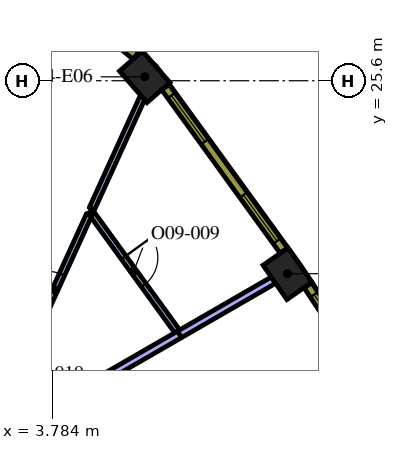
"""IFC4 building model, lengths in metres.
Left out: names, types, materials, properties, quantities, classifications, styles, units other than length and angle.
Written with IfcOpenShell. Run it as: python <this file> out.ifc"""

import sys

from ifc_helpers import new_model, si_unit, direction, frame, frame_2d, origin, origin_2d, place, context, subcontext, project, spatial, rectangle, extrude, element, fill, save


model = new_model("IFC4")
c1 = context("Model", 3, precision=1e-05, world=origin(), true_north=direction((0.0, 1.0)))
c2 = subcontext(c1, "Body", "Model", "MODEL_VIEW")
j1 = project(units=[si_unit("LENGTHUNIT", "METRE"), si_unit("PLANEANGLEUNIT", "RADIAN")], contexts=[c1])
p1 = place(None, origin())
s1 = spatial("IfcSite", under=j1, at=p1, CompositionType="ELEMENT")
p2 = place(p1, origin())
s2 = spatial("IfcBuilding", under=s1, at=p2, CompositionType="ELEMENT")
p3 = place(p2, frame((0.0, 0.0, 239.4)))
s3 = spatial("IfcBuildingStorey", under=s2, at=p3, CompositionType="ELEMENT", Elevation=239.4)
for number, where, z_axis, x_axis in (
    (1, (9.975, 20.522, 0.0), (0.0, 0.0, 1.0), (-0.57, 0.822, 0.0)),
    (2, (6.219, 25.703, 0.0), (0.0, 0.0, 1.0), (-0.657, 0.754, 0.0)),
):
    element("IfcColumn", number, at=place(p3, frame(where, z_axis=z_axis, x_axis=x_axis)), inside=s3, PredefinedType="COLUMN", context=c2, shape_type="SweptSolid", body=[
        extrude(rectangle(XDim=1.1, YDim=0.8, at=origin_2d()), origin(), (0.0, 0.0, 1.0), 4.2),
    ])
p4 = place(p3, frame((7.128, 18.922, 0.0), z_axis=(0.0, 0.0, 1.0), x_axis=(0.866023575777, 0.500003166188, 0.0)))
e3 = element("IfcWall", 3, at=p4, inside=s3, PredefinedType="PARTITIONING", context=c2, shape_type="SweptSolid", body=[
    extrude(rectangle(XDim=2.861, YDim=0.2, at=frame_2d((1.43, 0.0))), origin(), (0.0, 0.0, 1.0), 3.45),
])
p5 = place(p3, frame((4.111, 17.18, 0.0), z_axis=(0.0, 0.0, 1.0), x_axis=(0.866031916153, 0.499988720078, 0.0)))
e4 = element("IfcWall", 4, at=p5, inside=s3, PredefinedType="PARTITIONING", context=c2, shape_type="SweptSolid", body=[
    extrude(rectangle(XDim=3.492, YDim=0.2, at=frame_2d((1.746, 0.0))), origin(), (0.0, 0.0, 1.0), 3.45),
])
p6 = place(p3, frame((4.791, 22.152, 0.0), z_axis=(0.0, 0.0, 1.0), x_axis=(0.586987127968, -0.809596264567, 0.0)))
e5 = element("IfcWall", 5, at=p6, inside=s3, PredefinedType="PARTITIONING", context=c2, shape_type="SweptSolid", body=[
    extrude(rectangle(XDim=3.887, YDim=0.15, at=frame_2d((1.943, 0.0))), origin(), (0.0, 0.0, 1.0), 3.45),
])
p7 = place(p6, frame((1.487, 0.0, 0.0)))
e6 = element("IfcOpeningElement", 6, at=p7, cuts=e5, PredefinedType="OPENING", context=c2, shape_type="SweptSolid", body=[
    extrude(rectangle(XDim=0.9, YDim=2.1, at=frame_2d((0.45, 1.05))), frame((0.0, 0.085, 0.0), z_axis=(0.0, -1.0, 0.0), x_axis=(1.0, 0.0, 0.0)), (0.0, 0.0, 1.0), 0.17),
])
p8 = place(p3, frame((4.827, 22.23, 0.0), z_axis=(0.0, 0.0, 1.0), x_axis=(0.414339921123, 0.91012220595, 0.0)))
e7 = element("IfcWall", 7, at=p8, inside=s3, PredefinedType="PARTITIONING", context=c2, shape_type="SweptSolid", body=[
    extrude(rectangle(XDim=3.219, YDim=0.15, at=frame_2d((1.61, 0.0))), origin(), (0.0, 0.0, 1.0), 3.45),
])
p9 = place(p3, frame((3.129, 18.5, 0.0), z_axis=(0.0, 0.0, 1.0), x_axis=(0.414332290546, 0.910125679789, 0.0)))
e8 = element("IfcWall", 8, at=p9, inside=s3, PredefinedType="PARTITIONING", context=c2, shape_type="SweptSolid", body=[
    extrude(rectangle(XDim=3.926, YDim=0.15, at=frame_2d((1.963, 0.0))), origin(), (0.0, 0.0, 1.0), 3.45),
])
p10 = place(p9, frame((1.3, 0.0, 0.0)))
e9 = element("IfcOpeningElement", 9, at=p10, cuts=e8, PredefinedType="OPENING", context=c2, shape_type="SweptSolid", body=[
    extrude(rectangle(XDim=0.9, YDim=2.1, at=frame_2d((0.45, 1.05))), frame((0.0, 0.085, 0.0), z_axis=(0.0, -1.0, 0.0), x_axis=(1.0, 0.0, 0.0)), (0.0, 0.0, 1.0), 0.17),
])
p11 = place(p3, frame((4.061, 17.266, 0.0), z_axis=(0.0, 0.0, 1.0), x_axis=(-0.49995489152, 0.866051445611, 0.0)))
e10 = element("IfcWall", 10, at=p11, inside=s3, PredefinedType="PARTITIONING", context=c2, shape_type="SweptSolid", body=[
    extrude(rectangle(XDim=1.425, YDim=0.2, at=frame_2d((0.712, 0.0))), origin(), (0.0, 0.0, 1.0), 3.45),
])
p12 = place(p11, frame((0.2, 0.0, 0.0)))
e11 = element("IfcOpeningElement", 11, at=p12, cuts=e10, PredefinedType="OPENING", context=c2, shape_type="SweptSolid", body=[
    extrude(rectangle(XDim=1.0, YDim=2.1, at=frame_2d((0.5, 1.05))), frame((0.0, 0.11, 0.0), z_axis=(0.0, -1.0, 0.0), x_axis=(1.0, 0.0, 0.0)), (0.0, 0.0, 1.0), 0.22),
])
p13 = place(p3, frame((13.442, 15.803, 0.0), z_axis=(0.0, 0.0, 1.0), x_axis=(-0.552901821755, 0.833246407433, 0.0)))
e12 = element("IfcWall", 12, at=p13, inside=s3, PredefinedType="SOLIDWALL", context=c2, shape_type="SweptSolid", body=[
    extrude(rectangle(XDim=5.298, YDim=0.24, at=frame_2d((2.649, 0.0))), origin(), (0.0, 0.0, 1.0), 3.95),
])
p14 = place(p13, frame((0.295, 0.0, 0.9)))
e13 = element("IfcOpeningElement", 13, at=p14, cuts=e12, PredefinedType="OPENING", context=c2, shape_type="SweptSolid", body=[
    extrude(rectangle(XDim=1.5, YDim=2.55, at=frame_2d((0.75, 1.275))), frame((0.0, 0.13, 0.0), z_axis=(0.0, -1.0, 0.0), x_axis=(1.0, 0.0, 0.0)), (0.0, 0.0, 1.0), 0.26),
])
p15 = place(p13, frame((3.504, 0.0, 0.9)))
e14 = element("IfcOpeningElement", 14, at=p15, cuts=e12, PredefinedType="OPENING", context=c2, shape_type="SweptSolid", body=[
    extrude(rectangle(XDim=1.5, YDim=2.55, at=frame_2d((0.75, 1.275))), frame((0.0, 0.13, 0.0), z_axis=(0.0, -1.0, 0.0), x_axis=(1.0, 0.0, 0.0)), (0.0, 0.0, 1.0), 0.26),
])
p16 = place(p3, frame((9.878, 21.132, 0.0), z_axis=(0.0, 0.0, 1.0), x_axis=(-0.586998456641, 0.80958805074, 0.0)))
e15 = element("IfcWall", 15, at=p16, inside=s3, PredefinedType="SOLIDWALL", context=c2, shape_type="SweptSolid", body=[
    extrude(rectangle(XDim=5.311, YDim=0.24, at=frame_2d((2.655, 0.0))), origin(), (0.0, 0.0, 1.0), 3.95),
])
p17 = place(p16, frame((0.306, 0.0, 0.9)))
e16 = element("IfcOpeningElement", 16, at=p17, cuts=e15, PredefinedType="OPENING", context=c2, shape_type="SweptSolid", body=[
    extrude(rectangle(XDim=1.5, YDim=2.55, at=frame_2d((0.75, 1.275))), frame((0.0, 0.13, 0.0), z_axis=(0.0, -1.0, 0.0), x_axis=(1.0, 0.0, 0.0)), (0.0, 0.0, 1.0), 0.26),
])
p18 = place(p16, frame((3.539, 0.0, 0.9)))
e17 = element("IfcOpeningElement", 17, at=p18, cuts=e15, PredefinedType="OPENING", context=c2, shape_type="SweptSolid", body=[
    extrude(rectangle(XDim=1.5, YDim=2.55, at=frame_2d((0.75, 1.275))), frame((0.0, 0.13, 0.0), z_axis=(0.0, -1.0, 0.0), x_axis=(1.0, 0.0, 0.0)), (0.0, 0.0, 1.0), 0.26),
])
p19 = place(p3, frame((5.987, 26.259, 0.0), z_axis=(0.0, 0.0, 1.0), x_axis=(-0.769990037733, 0.638055908045, 0.0)))
e18 = element("IfcWall", 18, at=p19, inside=s3, PredefinedType="SOLIDWALL", context=c2, shape_type="SweptSolid", body=[
    extrude(rectangle(XDim=2.609, YDim=0.24, at=frame_2d((1.305, 0.0))), origin(), (0.0, 0.0, 1.0), 3.95),
])
p20 = place(p19, frame((0.805, 0.0, 0.9)))
e19 = element("IfcOpeningElement", 19, at=p20, cuts=e18, PredefinedType="OPENING", context=c2, shape_type="SweptSolid", body=[
    extrude(rectangle(XDim=1.0, YDim=2.55, at=frame_2d((0.5, 1.275))), frame((0.0, 0.13, 0.0), z_axis=(0.0, -1.0, 0.0), x_axis=(1.0, 0.0, 0.0)), (0.0, 0.0, 1.0), 0.26),
])
p21 = place(p7, origin())
e20 = element("IfcDoor", 20, at=p21, inside=s3, OperationType="SINGLE_SWING_LEFT", PredefinedType="DOOR", context=c2, shape_type="SweptSolid", body=[
    extrude(rectangle(XDim=0.9, YDim=2.1, at=frame_2d((0.45, 1.05))), frame((0.0, 0.025, 0.0), z_axis=(0.0, -1.0, 0.0), x_axis=(1.0, 0.0, 0.0)), (0.0, 0.0, 1.0), 0.05),
])
fill(e6, e20)
p22 = place(p12, origin())
e21 = element("IfcDoor", 21, at=p22, inside=s3, OperationType="SINGLE_SWING_LEFT", PredefinedType="DOOR", context=c2, shape_type="SweptSolid", body=[
    extrude(rectangle(XDim=1.0, YDim=2.1, at=frame_2d((0.5, 1.05))), frame((0.0, 0.025, 0.0), z_axis=(0.0, -1.0, 0.0), x_axis=(1.0, 0.0, 0.0)), (0.0, 0.0, 1.0), 0.05),
])
fill(e11, e21)
p23 = place(p10, origin())
e22 = element("IfcDoor", 22, at=p23, inside=s3, OperationType="SINGLE_SWING_LEFT", PredefinedType="DOOR", context=c2, shape_type="SweptSolid", body=[
    extrude(rectangle(XDim=0.9, YDim=2.1, at=frame_2d((0.45, 1.05))), frame((0.0, 0.025, 0.0), z_axis=(0.0, -1.0, 0.0), x_axis=(1.0, 0.0, 0.0)), (0.0, 0.0, 1.0), 0.05),
])
fill(e9, e22)
p24 = place(p15, origin())
e23 = element("IfcWindow", 23, at=p24, inside=s3, PartitioningType="SINGLE_PANEL", PredefinedType="WINDOW", context=c2, shape_type="SweptSolid", body=[
    extrude(rectangle(XDim=1.5, YDim=2.55, at=frame_2d((0.75, 1.275))), frame((0.0, 0.04, 0.0), z_axis=(0.0, -1.0, 0.0), x_axis=(1.0, 0.0, 0.0)), (0.0, 0.0, 1.0), 0.06),
])
fill(e14, e23)
p25 = place(p17, origin())
e24 = element("IfcWindow", 24, at=p25, inside=s3, PartitioningType="SINGLE_PANEL", PredefinedType="WINDOW", context=c2, shape_type="SweptSolid", body=[
    extrude(rectangle(XDim=1.5, YDim=2.55, at=frame_2d((0.75, 1.275))), frame((0.0, 0.04, 0.0), z_axis=(0.0, -1.0, 0.0), x_axis=(1.0, 0.0, 0.0)), (0.0, 0.0, 1.0), 0.06),
])
fill(e16, e24)
p26 = place(p18, origin())
e25 = element("IfcWindow", 25, at=p26, inside=s3, PartitioningType="SINGLE_PANEL", PredefinedType="WINDOW", context=c2, shape_type="SweptSolid", body=[
    extrude(rectangle(XDim=1.5, YDim=2.55, at=frame_2d((0.75, 1.275))), frame((0.0, 0.04, 0.0), z_axis=(0.0, -1.0, 0.0), x_axis=(1.0, 0.0, 0.0)), (0.0, 0.0, 1.0), 0.06),
])
fill(e17, e25)
save(model, sys.argv[1])
